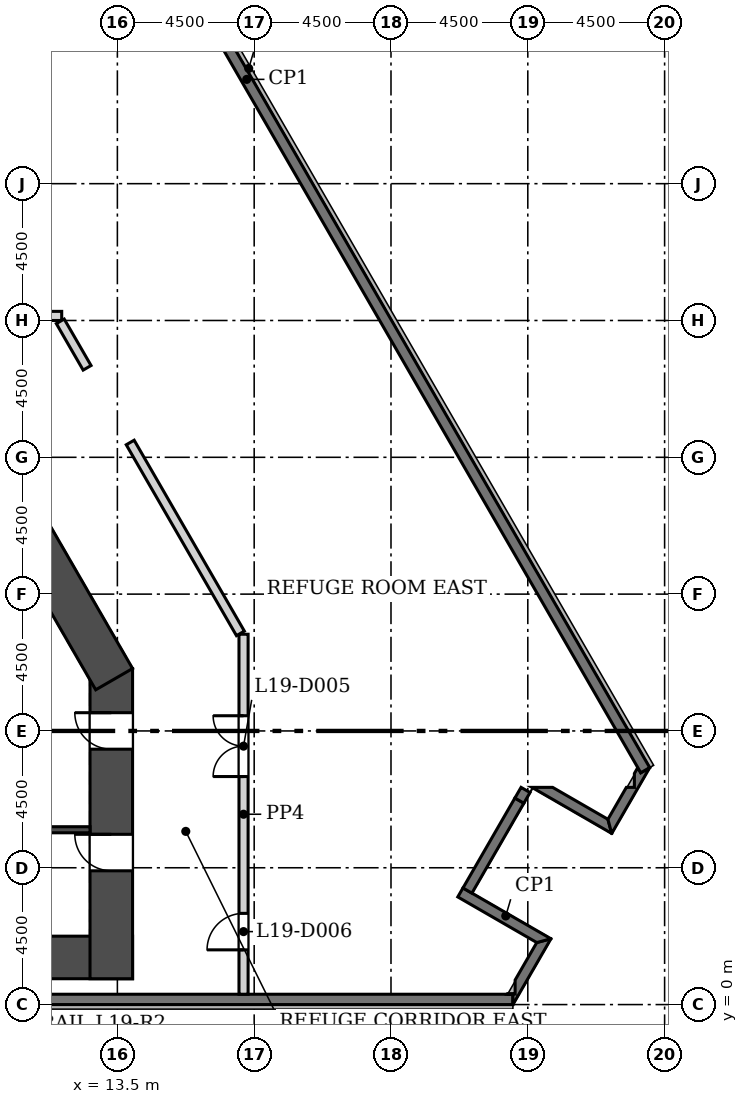
"""IFC4 building model, lengths in metres.
Left out: names, types, materials, properties, quantities, classifications, styles, units other than length and angle.
Written with IfcOpenShell. Run it as: python <this file> out.ifc"""

import sys

from ifc_helpers import new_model, si_unit, direction, frame, frame_2d, origin, place, context, subcontext, project, spatial, polyline, rectangle, outline, extrude, element, fill, save


model = new_model("IFC4")
c1 = context("Model", 3, precision=1e-05, world=origin(), true_north=direction((0.0, 1.0)))
c2 = subcontext(c1, "Body", "Model", "MODEL_VIEW")
j1 = project(units=[si_unit("LENGTHUNIT", "METRE"), si_unit("PLANEANGLEUNIT", "RADIAN")], contexts=[c1])
p1 = place(None, origin())
s1 = spatial("IfcSite", under=j1, at=p1, CompositionType="ELEMENT")
p2 = place(p1, origin())
s2 = spatial("IfcBuilding", under=s1, at=p2, CompositionType="ELEMENT")
p3 = place(p2, frame((0.0, 0.0, 88.9)))
s3 = spatial("IfcBuildingStorey", under=s2, at=p3, CompositionType="ELEMENT", Elevation=88.9)
p4 = place(p3, frame((-14.0, 1.55, 0.0), z_axis=(0.0, 0.0, 1.0), x_axis=(1.0, 0.0, 0.0)))
e1 = element("IfcWall", 1, at=p4, inside=s3, PredefinedType="SHEAR", context=c2, shape_type="SweptSolid", body=[
    extrude(rectangle(XDim=28.0, YDim=1.4, at=frame_2d((14.0, 0.0))), origin(), (0.0, 0.0, 1.0), 7.2),
])
p5 = place(p3, frame((13.3, 0.85, 0.0), z_axis=(0.0, 0.0, 1.0), x_axis=(0.0, 1.0, 0.0)))
e2 = element("IfcWall", 2, at=p5, inside=s3, PredefinedType="SHEAR", context=c2, shape_type="SweptSolid", body=[
    extrude(rectangle(XDim=10.202, YDim=1.4, at=frame_2d((5.101, 0.0))), origin(), (0.0, 0.0, 1.0), 7.2),
])
p6 = place(p5, frame((3.55, 0.0, 0.0)))
e3 = element("IfcOpeningElement", 3, at=p6, cuts=e2, PredefinedType="OPENING", context=c2, shape_type="SweptSolid", body=[
    extrude(rectangle(XDim=1.2, YDim=2.1, at=frame_2d((0.6, 1.05))), frame((0.0, 0.71, 0.0), z_axis=(0.0, -1.0, 0.0), x_axis=(1.0, 0.0, 0.0)), (0.0, 0.0, 1.0), 1.42),
])
p7 = place(p5, frame((7.55, 0.0, 0.0)))
e4 = element("IfcOpeningElement", 4, at=p7, cuts=e2, PredefinedType="OPENING", context=c2, shape_type="SweptSolid", body=[
    extrude(rectangle(XDim=1.2, YDim=2.1, at=frame_2d((0.6, 1.05))), frame((0.0, 0.71, 0.0), z_axis=(0.0, -1.0, 0.0), x_axis=(1.0, 0.0, 0.0)), (0.0, 0.0, 1.0), 1.42),
])
p8 = place(p3, frame((13.394, 10.703, 0.0), z_axis=(0.0, 0.0, 1.0), x_axis=(-0.50000187635, 0.866024320471, 0.0)))
e5 = element("IfcWall", 5, at=p8, inside=s3, PredefinedType="SHEAR", context=c2, shape_type="SweptSolid", body=[
    extrude(rectangle(XDim=9.177, YDim=1.4, at=frame_2d((4.588, 0.0))), origin(), (0.0, 0.0, 1.0), 7.2),
])
p9 = place(p3, frame((-26.51, 0.17, 0.0), z_axis=(0.0, 0.0, 1.0), x_axis=(1.0, 0.0, 0.0)))
e6 = element("IfcWall", 6, at=p9, inside=s3, PredefinedType="SOLIDWALL", context=c2, shape_type="SweptSolid", body=[
    extrude(rectangle(XDim=53.021, YDim=0.34, at=frame_2d((26.51, 0.0))), origin(), (0.0, 0.0, 1.0), 6.8),
])
p10 = place(p3, origin())
e7 = element("IfcWall", 7, at=p10, inside=s3, PredefinedType="SOLIDWALL", context=c2, shape_type="SweptSolid", body=[
    extrude(outline(polyline([(27.761, 2.166), (26.51, -0.001), (26.51, -0.001), (26.51, 0.339), (26.313, 0.339), (26.319, 0.35), (26.583, 0.35), (26.583, 0.807), (27.296, 2.041), (27.761, 2.166), (27.761, 2.166)])), origin(), (0.0, 0.0, 1.0), 6.8),
])
p11 = place(p3, origin())
e8 = element("IfcWall", 8, at=p11, inside=s3, PredefinedType="SOLIDWALL", context=c2, shape_type="SweptSolid", body=[
    extrude(outline(polyline([(24.697, 3.54), (24.868, 3.836), (25.163, 3.666), (27.762, 2.165), (27.762, 2.165), (27.296, 2.04), (24.697, 3.54)])), origin(), (0.0, 0.0, 1.0), 6.8),
])
p12 = place(p3, frame((25.015, 3.75, 0.0), z_axis=(0.0, 0.0, 1.0), x_axis=(0.499982281718, 0.866035633198, 0.0)))
e9 = element("IfcWall", 9, at=p12, inside=s3, PredefinedType="SOLIDWALL", context=c2, shape_type="SweptSolid", body=[
    extrude(rectangle(XDim=3.416, YDim=0.34, at=frame_2d((1.708, 0.0))), origin(), (0.0, 0.0, 1.0), 6.8),
])
p13 = place(p3, frame((26.723, 6.708, 0.0), z_axis=(0.0, 0.0, 1.0), x_axis=(0.500418219013, 0.865783810244, 0.0)))
e10 = element("IfcWall", 10, at=p13, inside=s3, PredefinedType="SOLIDWALL", context=c2, shape_type="SweptSolid", body=[
    extrude(rectangle(XDim=0.405, YDim=0.34, at=frame_2d((0.203, 0.0))), origin(), (0.0, 0.0, 1.0), 6.3),
])
p14 = place(p3, origin())
e11 = element("IfcWall", 11, at=p14, inside=s3, PredefinedType="SOLIDWALL", context=c2, shape_type="SweptSolid", body=[
    extrude(outline(polyline([(29.761, 5.628), (27.162, 7.129), (27.135, 7.144), (27.818, 7.144), (29.636, 6.094), (29.761, 5.628), (29.761, 5.628)])), origin(), (0.0, 0.0, 1.0), 6.8),
])
p15 = place(p3, origin())
e12 = element("IfcWall", 12, at=p15, inside=s3, PredefinedType="SOLIDWALL", context=c2, shape_type="SweptSolid", body=[
    extrude(outline(polyline([(30.242, 7.144), (30.506, 7.144), (30.506, 7.601), (30.618, 7.795), (30.716, 7.625), (31.011, 7.795), (31.011, 7.795), (29.76, 5.628), (29.76, 5.628), (29.635, 6.094), (30.242, 7.144)])), origin(), (0.0, 0.0, 1.0), 6.8),
])
p16 = place(p3, frame((30.863, 7.709, 0.0), z_axis=(0.0, 0.0, 1.0), x_axis=(-0.500000400847, 0.866025172355, 0.0)))
e13 = element("IfcWall", 13, at=p16, inside=s3, PredefinedType="SOLIDWALL", context=c2, shape_type="SweptSolid", body=[
    extrude(rectangle(XDim=53.021, YDim=0.34, at=frame_2d((26.51, 0.0))), origin(), (0.0, 0.0, 1.0), 6.8),
])
p17 = place(p16, frame((30.755, 0.0, 0.9)))
e14 = element("IfcOpeningElement", 14, at=p17, cuts=e13, PredefinedType="OPENING", context=c2, shape_type="SweptSolid", body=[
    extrude(rectangle(XDim=1.885, YDim=3.0, at=frame_2d((0.942, 1.5))), frame((0.0, 0.18, 0.0), z_axis=(0.0, -1.0, 0.0), x_axis=(1.0, 0.0, 0.0)), (0.0, 0.0, 1.0), 0.36),
])
p18 = place(p16, frame((36.755, 0.0, 0.9)))
e15 = element("IfcOpeningElement", 15, at=p18, cuts=e13, PredefinedType="OPENING", context=c2, shape_type="SweptSolid", body=[
    extrude(rectangle(XDim=1.885, YDim=3.0, at=frame_2d((0.942, 1.5))), frame((0.0, 0.18, 0.0), z_axis=(0.0, -1.0, 0.0), x_axis=(1.0, 0.0, 0.0)), (0.0, 0.0, 1.0), 0.36),
])
p19 = place(p16, frame((42.755, 0.0, 0.9)))
e16 = element("IfcOpeningElement", 16, at=p19, cuts=e13, PredefinedType="OPENING", context=c2, shape_type="SweptSolid", body=[
    extrude(rectangle(XDim=1.885, YDim=3.0, at=frame_2d((0.942, 1.5))), frame((0.0, 0.18, 0.0), z_axis=(0.0, -1.0, 0.0), x_axis=(1.0, 0.0, 0.0)), (0.0, 0.0, 1.0), 0.36),
])
p20 = place(p16, frame((48.755, 0.0, 0.9)))
e17 = element("IfcOpeningElement", 17, at=p20, cuts=e13, PredefinedType="OPENING", context=c2, shape_type="SweptSolid", body=[
    extrude(rectangle(XDim=1.885, YDim=3.0, at=frame_2d((0.942, 1.5))), frame((0.0, 0.18, 0.0), z_axis=(0.0, -1.0, 0.0), x_axis=(1.0, 0.0, 0.0)), (0.0, 0.0, 1.0), 0.36),
])
p21 = place(p3, frame((1.2, 5.75, -0.3), z_axis=(0.0, 0.0, 1.0), x_axis=(1.0, 0.0, 0.0)))
e18 = element("IfcWall", 18, at=p21, inside=s3, PredefinedType="SOLIDWALL", context=c2, shape_type="SweptSolid", body=[
    extrude(rectangle(XDim=11.4, YDim=0.2, at=frame_2d((5.7, 0.0))), origin(), (0.0, 0.0, 1.0), 7.1),
])
p22 = place(p3, frame((17.65, 12.181, 0.0), z_axis=(0.0, 0.0, 1.0), x_axis=(0.0, -1.0, 0.0)))
e19 = element("IfcWall", 19, at=p22, inside=s3, PredefinedType="SOLIDWALL", context=c2, shape_type="SweptSolid", body=[
    extrude(rectangle(XDim=11.841, YDim=0.3, at=frame_2d((5.92, 0.0))), origin(), (0.0, 0.0, 1.0), 6.8),
])
p23 = place(p22, frame((2.681, 0.0, 0.0)))
e20 = element("IfcOpeningElement", 20, at=p23, cuts=e19, PredefinedType="OPENING", context=c2, shape_type="SweptSolid", body=[
    extrude(rectangle(XDim=2.0, YDim=2.1, at=frame_2d((1.0, 1.05))), frame((0.0, 0.16, 0.0), z_axis=(0.0, -1.0, 0.0), x_axis=(1.0, 0.0, 0.0)), (0.0, 0.0, 1.0), 0.32),
])
p24 = place(p22, frame((9.181, 0.0, 0.0)))
e21 = element("IfcOpeningElement", 21, at=p24, cuts=e19, PredefinedType="OPENING", context=c2, shape_type="SweptSolid", body=[
    extrude(rectangle(XDim=1.2, YDim=2.1, at=frame_2d((0.6, 1.05))), frame((0.0, 0.16, 0.0), z_axis=(0.0, -1.0, 0.0), x_axis=(1.0, 0.0, 0.0)), (0.0, 0.0, 1.0), 0.32),
])
p25 = place(p3, frame((4.05, 22.65, 0.0), z_axis=(0.0, 0.0, 1.0), x_axis=(1.0, 0.0, 0.0)))
e22 = element("IfcWall", 22, at=p25, inside=s3, PredefinedType="SOLIDWALL", context=c2, shape_type="SweptSolid", body=[
    extrude(rectangle(XDim=7.619, YDim=0.3, at=frame_2d((3.81, 0.0))), origin(), (0.0, 0.0, 1.0), 6.8),
])
p26 = place(p3, frame((13.922, 18.488, 0.0), z_axis=(0.0, 0.0, 1.0), x_axis=(0.49999933652, -0.866025786844, 0.0)))
e23 = element("IfcWall", 23, at=p26, inside=s3, PredefinedType="SOLIDWALL", context=c2, shape_type="SweptSolid", body=[
    extrude(rectangle(XDim=7.251, YDim=0.3, at=frame_2d((3.625, 0.0))), origin(), (0.0, 0.0, 1.0), 6.8),
])
p27 = place(p3, frame((11.621, 22.472, 0.0), z_axis=(0.0, 0.0, 1.0), x_axis=(0.500005731256, -0.866022094817, 0.0)))
e24 = element("IfcWall", 24, at=p27, inside=s3, PredefinedType="SOLIDWALL", context=c2, shape_type="SweptSolid", body=[
    extrude(rectangle(XDim=1.766, YDim=0.3, at=frame_2d((0.883, 0.0))), origin(), (0.0, 0.0, 1.0), 6.8),
])
p28 = place(p6, origin())
e25 = element("IfcDoor", 25, at=p28, inside=s3, OperationType="SINGLE_SWING_RIGHT", PredefinedType="DOOR", context=c2, shape_type="SweptSolid", body=[
    extrude(rectangle(XDim=1.2, YDim=2.1, at=frame_2d((0.6, 1.05))), frame((0.0, 0.025, 0.0), z_axis=(0.0, -1.0, 0.0), x_axis=(1.0, 0.0, 0.0)), (0.0, 0.0, 1.0), 0.05),
])
fill(e3, e25)
p29 = place(p7, origin())
e26 = element("IfcDoor", 26, at=p29, inside=s3, OperationType="SINGLE_SWING_RIGHT", PredefinedType="DOOR", context=c2, shape_type="SweptSolid", body=[
    extrude(rectangle(XDim=1.2, YDim=2.1, at=frame_2d((0.6, 1.05))), frame((0.0, 0.025, 0.0), z_axis=(0.0, -1.0, 0.0), x_axis=(1.0, 0.0, 0.0)), (0.0, 0.0, 1.0), 0.05),
])
fill(e4, e26)
p30 = place(p23, frame((2.0, 0.0, 0.0), z_axis=(0.0, 0.0, 1.0), x_axis=(-1.0, 0.0, 0.0)))
e27 = element("IfcDoor", 27, at=p30, inside=s3, OperationType="DOUBLE_DOOR_SINGLE_SWING", PredefinedType="DOOR", context=c2, shape_type="SweptSolid", body=[
    extrude(rectangle(XDim=2.0, YDim=2.1, at=frame_2d((1.0, 1.05))), frame((0.0, 0.025, 0.0), z_axis=(0.0, -1.0, 0.0), x_axis=(1.0, 0.0, 0.0)), (0.0, 0.0, 1.0), 0.05),
])
fill(e20, e27)
p31 = place(p24, frame((1.2, 0.0, 0.0), z_axis=(0.0, 0.0, 1.0), x_axis=(-1.0, 0.0, 0.0)))
e28 = element("IfcDoor", 28, at=p31, inside=s3, OperationType="SINGLE_SWING_LEFT", PredefinedType="DOOR", context=c2, shape_type="SweptSolid", body=[
    extrude(rectangle(XDim=1.2, YDim=2.1, at=frame_2d((0.6, 1.05))), frame((0.0, 0.025, 0.0), z_axis=(0.0, -1.0, 0.0), x_axis=(1.0, 0.0, 0.0)), (0.0, 0.0, 1.0), 0.05),
])
fill(e21, e28)
save(model, sys.argv[1])
